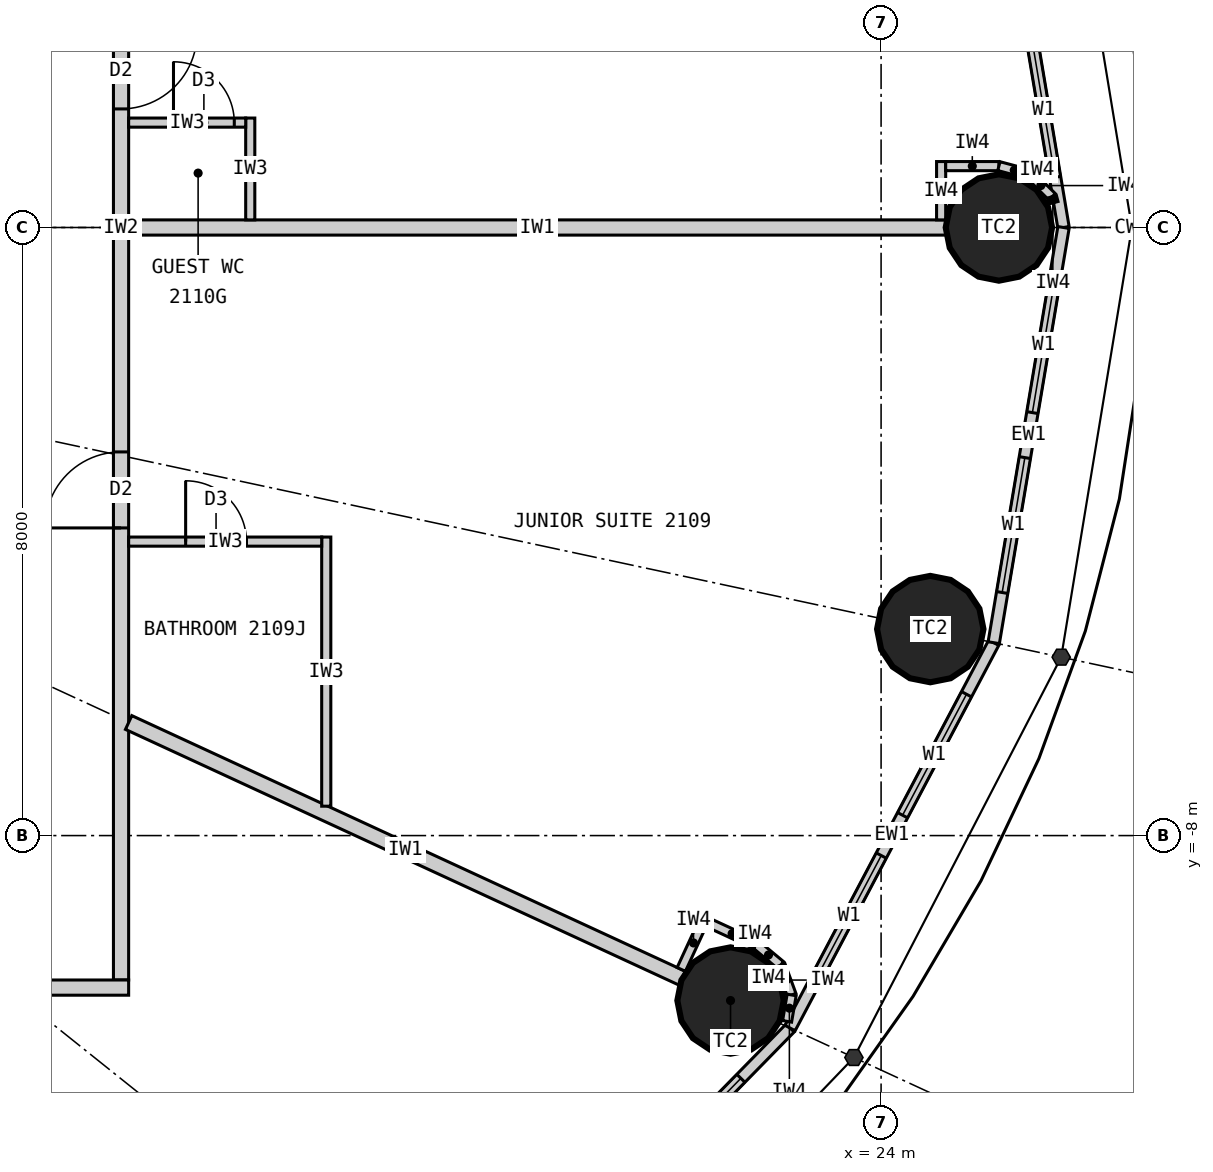
"""IFC4 building model, lengths in metres.
Left out: names, types, materials, properties, quantities, classifications, styles, units other than length and angle.
Written with IfcOpenShell. Run it as: python <this file> out.ifc"""

import sys

from ifc_helpers import new_model, si_unit, direction, frame, frame_2d, origin, origin_2d, place, context, subcontext, project, spatial, rectangle, circle, extrude, element, fill, save


model = new_model("IFC4")
c1 = context("Model", 3, precision=1e-05, world=origin(), true_north=direction((0.0, 1.0)))
c2 = subcontext(c1, "Body", "Model", "MODEL_VIEW")
j1 = project(units=[si_unit("LENGTHUNIT", "METRE"), si_unit("PLANEANGLEUNIT", "RADIAN")], contexts=[c1])
p1 = place(None, origin())
s1 = spatial("IfcSite", under=j1, at=p1, CompositionType="ELEMENT")
p2 = place(p1, origin())
s2 = spatial("IfcBuilding", under=s1, at=p2, CompositionType="ELEMENT")
p3 = place(p2, frame((0.0, 0.0, 83.7)))
s3 = spatial("IfcBuildingStorey", under=s2, at=p3, CompositionType="ELEMENT", Elevation=83.7)
for number, where, z_axis, x_axis in (
    (1, (25.55, 0.0, 0.0), (0.0, 0.0, 1.0), (1.0, 0.0, 0.0)),
    (2, (22.019, -10.17, 0.0), (0.0, 0.0, 1.0), (1.0, 0.0, 0.0)),
    (3, (24.647, -5.283, 0.0), (0.0, 0.0, 1.0), (1.0, 0.0, 0.0)),
):
    element("IfcColumn", number, at=place(p3, frame(where, z_axis=z_axis, x_axis=x_axis)), inside=s3, PredefinedType="COLUMN", context=c2, shape_type="SweptSolid", body=[
        extrude(circle(Radius=0.7, at=origin_2d()), origin(), (0.0, 0.0, 1.0), 3.3),
    ])
p4 = place(p3, frame((26.4, 0.0, 0.0), z_axis=(0.0, 0.0, 1.0), x_axis=(-0.165642551694, 0.986185857264, 0.0)))
e4 = element("IfcWall", 4, at=p4, inside=s3, PredefinedType="ELEMENTEDWALL", context=c2, shape_type="SweptSolid", body=[
    extrude(rectangle(XDim=5.539, YDim=0.15, at=frame_2d((2.77, 0.0))), origin(), (0.0, 0.0, 1.0), 3.12),
])
p5 = place(p4, frame((0.669, 0.0, 0.9)))
e5 = element("IfcOpeningElement", 5, at=p5, cuts=e4, PredefinedType="OPENING", context=c2, shape_type="SweptSolid", body=[
    extrude(rectangle(XDim=1.8, YDim=1.9, at=frame_2d((0.9, 0.95))), frame((0.0, 0.085, 0.0), z_axis=(0.0, -1.0, 0.0), x_axis=(1.0, 0.0, 0.0)), (0.0, 0.0, 1.0), 0.17),
])
p6 = place(p4, frame((3.07, 0.0, 0.9)))
e6 = element("IfcOpeningElement", 6, at=p6, cuts=e4, PredefinedType="OPENING", context=c2, shape_type="SweptSolid", body=[
    extrude(rectangle(XDim=1.8, YDim=1.9, at=frame_2d((0.9, 0.95))), frame((0.0, 0.085, 0.0), z_axis=(0.0, -1.0, 0.0), x_axis=(1.0, 0.0, 0.0)), (0.0, 0.0, 1.0), 0.17),
])
p7 = place(p3, frame((18.57, -14.856, 0.0), z_axis=(0.0, 0.0, 1.0), x_axis=(0.699602905915, 0.714531856557, 0.0)))
e7 = element("IfcWall", 7, at=p7, inside=s3, PredefinedType="ELEMENTEDWALL", context=c2, shape_type="SweptSolid", body=[
    extrude(rectangle(XDim=6.051, YDim=0.15, at=frame_2d((3.025, 0.0))), origin(), (0.0, 0.0, 1.0), 3.12),
])
p8 = place(p7, frame((0.926, 0.0, 0.9)))
e8 = element("IfcOpeningElement", 8, at=p8, cuts=e7, PredefinedType="OPENING", context=c2, shape_type="SweptSolid", body=[
    extrude(rectangle(XDim=1.8, YDim=1.9, at=frame_2d((0.9, 0.95))), frame((0.0, 0.085, 0.0), z_axis=(0.0, -1.0, 0.0), x_axis=(1.0, 0.0, 0.0)), (0.0, 0.0, 1.0), 0.17),
])
p9 = place(p7, frame((3.325, 0.0, 0.9)))
e9 = element("IfcOpeningElement", 9, at=p9, cuts=e7, PredefinedType="OPENING", context=c2, shape_type="SweptSolid", body=[
    extrude(rectangle(XDim=1.8, YDim=1.9, at=frame_2d((0.9, 0.95))), frame((0.0, 0.085, 0.0), z_axis=(0.0, -1.0, 0.0), x_axis=(1.0, 0.0, 0.0)), (0.0, 0.0, 1.0), 0.17),
])
p10 = place(p3, frame((22.803, -10.532, 0.0), z_axis=(0.0, 0.0, 1.0), x_axis=(0.467296867008, 0.884100468321, 0.0)))
e10 = element("IfcWall", 10, at=p10, inside=s3, PredefinedType="ELEMENTEDWALL", context=c2, shape_type="SweptSolid", body=[
    extrude(rectangle(XDim=5.734, YDim=0.15, at=frame_2d((2.867, 0.0))), origin(), (0.0, 0.0, 1.0), 3.12),
])
p11 = place(p10, frame((0.767, 0.0, 0.9)))
e11 = element("IfcOpeningElement", 11, at=p11, cuts=e10, PredefinedType="OPENING", context=c2, shape_type="SweptSolid", body=[
    extrude(rectangle(XDim=1.8, YDim=1.9, at=frame_2d((0.9, 0.95))), frame((0.0, 0.085, 0.0), z_axis=(0.0, -1.0, 0.0), x_axis=(1.0, 0.0, 0.0)), (0.0, 0.0, 1.0), 0.17),
])
p12 = place(p10, frame((3.167, 0.0, 0.9)))
e12 = element("IfcOpeningElement", 12, at=p12, cuts=e10, PredefinedType="OPENING", context=c2, shape_type="SweptSolid", body=[
    extrude(rectangle(XDim=1.8, YDim=1.9, at=frame_2d((0.9, 0.95))), frame((0.0, 0.085, 0.0), z_axis=(0.0, -1.0, 0.0), x_axis=(1.0, 0.0, 0.0)), (0.0, 0.0, 1.0), 0.17),
])
p13 = place(p3, frame((25.482, -5.462, 0.0), z_axis=(0.0, 0.0, 1.0), x_axis=(0.165642551694, 0.986185857264, 0.0)))
e13 = element("IfcWall", 13, at=p13, inside=s3, PredefinedType="ELEMENTEDWALL", context=c2, shape_type="SweptSolid", body=[
    extrude(rectangle(XDim=5.539, YDim=0.15, at=frame_2d((2.77, 0.0))), origin(), (0.0, 0.0, 1.0), 3.12),
])
p14 = place(p13, frame((0.669, 0.0, 0.9)))
e14 = element("IfcOpeningElement", 14, at=p14, cuts=e13, PredefinedType="OPENING", context=c2, shape_type="SweptSolid", body=[
    extrude(rectangle(XDim=1.8, YDim=1.9, at=frame_2d((0.9, 0.95))), frame((0.0, 0.085, 0.0), z_axis=(0.0, -1.0, 0.0), x_axis=(1.0, 0.0, 0.0)), (0.0, 0.0, 1.0), 0.17),
])
p15 = place(p13, frame((3.07, 0.0, 0.9)))
e15 = element("IfcOpeningElement", 15, at=p15, cuts=e13, PredefinedType="OPENING", context=c2, shape_type="SweptSolid", body=[
    extrude(rectangle(XDim=1.8, YDim=1.9, at=frame_2d((0.9, 0.95))), frame((0.0, 0.085, 0.0), z_axis=(0.0, -1.0, 0.0), x_axis=(1.0, 0.0, 0.0)), (0.0, 0.0, 1.0), 0.17),
])
p16 = place(p3, frame((14.0, -9.9, 0.0), z_axis=(0.0, 0.0, 1.0), x_axis=(0.0, 1.0, 0.0)))
e16 = element("IfcWall", 16, at=p16, inside=s3, PredefinedType="PARTITIONING", context=c2, shape_type="SweptSolid", body=[
    extrude(rectangle(XDim=19.8, YDim=0.2, at=frame_2d((9.9, 0.0))), origin(), (0.0, 0.0, 1.0), 3.12),
])
p17 = place(p16, frame((5.948, 0.0, 0.0)))
e17 = element("IfcOpeningElement", 17, at=p17, cuts=e16, PredefinedType="OPENING", context=c2, shape_type="SweptSolid", body=[
    extrude(rectangle(XDim=1.0, YDim=2.2, at=frame_2d((0.5, 1.1))), frame((0.0, 0.11, 0.0), z_axis=(0.0, -1.0, 0.0), x_axis=(1.0, 0.0, 0.0)), (0.0, 0.0, 1.0), 0.22),
])
p18 = place(p16, frame((11.46, 0.0, 0.0)))
e18 = element("IfcOpeningElement", 18, at=p18, cuts=e16, PredefinedType="OPENING", context=c2, shape_type="SweptSolid", body=[
    extrude(rectangle(XDim=1.0, YDim=2.2, at=frame_2d((0.5, 1.1))), frame((0.0, 0.11, 0.0), z_axis=(0.0, -1.0, 0.0), x_axis=(1.0, 0.0, 0.0)), (0.0, 0.0, 1.0), 0.22),
])
p19 = place(p3, frame((14.1, -10.0, 0.0), z_axis=(0.0, 0.0, 1.0), x_axis=(-1.0, 0.0, 0.0)))
e19 = element("IfcWall", 19, at=p19, inside=s3, PredefinedType="PARTITIONING", context=c2, shape_type="SweptSolid", body=[
    extrude(rectangle(XDim=28.2, YDim=0.2, at=frame_2d((14.1, 0.0))), origin(), (0.0, 0.0, 1.0), 3.12),
])
p20 = place(p19, frame((23.865, 0.0, 0.0)))
e20 = element("IfcOpeningElement", 20, at=p20, cuts=e19, PredefinedType="OPENING", context=c2, shape_type="SweptSolid", body=[
    extrude(rectangle(XDim=1.0, YDim=2.2, at=frame_2d((0.5, 1.1))), frame((0.0, 0.11, 0.0), z_axis=(0.0, -1.0, 0.0), x_axis=(1.0, 0.0, 0.0)), (0.0, 0.0, 1.0), 0.22),
])
p21 = place(p19, frame((18.529, 0.0, 0.0)))
e21 = element("IfcOpeningElement", 21, at=p21, cuts=e19, PredefinedType="OPENING", context=c2, shape_type="SweptSolid", body=[
    extrude(rectangle(XDim=1.0, YDim=2.2, at=frame_2d((0.5, 1.1))), frame((0.0, 0.11, 0.0), z_axis=(0.0, -1.0, 0.0), x_axis=(1.0, 0.0, 0.0)), (0.0, 0.0, 1.0), 0.22),
])
p22 = place(p19, frame((14.923, 0.0, 0.0)))
e22 = element("IfcOpeningElement", 22, at=p22, cuts=e19, PredefinedType="OPENING", context=c2, shape_type="SweptSolid", body=[
    extrude(rectangle(XDim=1.0, YDim=2.2, at=frame_2d((0.5, 1.1))), frame((0.0, 0.11, 0.0), z_axis=(0.0, -1.0, 0.0), x_axis=(1.0, 0.0, 0.0)), (0.0, 0.0, 1.0), 0.22),
])
p23 = place(p19, frame((2.801, 0.0, 0.0)))
e23 = element("IfcOpeningElement", 23, at=p23, cuts=e19, PredefinedType="OPENING", context=c2, shape_type="SweptSolid", body=[
    extrude(rectangle(XDim=1.0, YDim=2.2, at=frame_2d((0.5, 1.1))), frame((0.0, 0.11, 0.0), z_axis=(0.0, -1.0, 0.0), x_axis=(1.0, 0.0, 0.0)), (0.0, 0.0, 1.0), 0.22),
])
p24 = place(p3, frame((14.1, 0.0, 0.0), z_axis=(0.0, 0.0, 1.0), x_axis=(1.0, 0.0, 0.0)))
e24 = element("IfcWall", 24, at=p24, inside=s3, PredefinedType="PARTITIONING", context=c2, shape_type="SweptSolid", body=[
    extrude(rectangle(XDim=10.75, YDim=0.2, at=frame_2d((5.375, 0.0))), origin(), (0.0, 0.0, 1.0), 2.27),
])
p25 = place(p3, frame((14.1, -6.512, 0.0), z_axis=(0.0, 0.0, 1.0), x_axis=(0.907832871056, -0.419332181247, 0.0)))
e25 = element("IfcWall", 25, at=p25, inside=s3, PredefinedType="PARTITIONING", context=c2, shape_type="SweptSolid", body=[
    extrude(rectangle(XDim=8.023, YDim=0.2, at=frame_2d((4.011, 0.0))), origin(), (0.0, 0.0, 1.0), 2.32),
])
p26 = place(p3, frame((16.7, -7.613, 0.0), z_axis=(0.0, 0.0, 1.0), x_axis=(0.0, 1.0, 0.0)))
e26 = element("IfcWall", 26, at=p26, inside=s3, PredefinedType="PARTITIONING", context=c2, shape_type="SweptSolid", body=[
    extrude(rectangle(XDim=3.541, YDim=0.12, at=frame_2d((1.771, 0.0))), origin(), (0.0, 0.0, 1.0), 3.12),
])
p27 = place(p3, frame((14.1, -4.133, 0.0), z_axis=(0.0, 0.0, 1.0), x_axis=(1.0, 0.0, 0.0)))
e27 = element("IfcWall", 27, at=p27, inside=s3, PredefinedType="PARTITIONING", context=c2, shape_type="SweptSolid", body=[
    extrude(rectangle(XDim=2.54, YDim=0.12, at=frame_2d((1.27, 0.0))), origin(), (0.0, 0.0, 1.0), 2.32),
])
p28 = place(p27, frame((0.75, 0.0, 0.0)))
e28 = element("IfcOpeningElement", 28, at=p28, cuts=e27, PredefinedType="OPENING", context=c2, shape_type="SweptSolid", body=[
    extrude(rectangle(XDim=0.8, YDim=2.1, at=frame_2d((0.4, 1.05))), frame((0.0, 0.07, 0.0), z_axis=(0.0, -1.0, 0.0), x_axis=(1.0, 0.0, 0.0)), (0.0, 0.0, 1.0), 0.14),
])
p29 = place(p3, frame((15.7, 0.1, 0.0), z_axis=(0.0, 0.0, 1.0), x_axis=(0.0, 1.0, 0.0)))
e29 = element("IfcWall", 29, at=p29, inside=s3, PredefinedType="PARTITIONING", context=c2, shape_type="SweptSolid", body=[
    extrude(rectangle(XDim=1.34, YDim=0.12, at=frame_2d((0.67, 0.0))), origin(), (0.0, 0.0, 1.0), 3.12),
])
p30 = place(p3, frame((14.1, 1.38, 0.0), z_axis=(0.0, 0.0, 1.0), x_axis=(1.0, 0.0, 0.0)))
e30 = element("IfcWall", 30, at=p30, inside=s3, PredefinedType="PARTITIONING", context=c2, shape_type="SweptSolid", body=[
    extrude(rectangle(XDim=1.54, YDim=0.12, at=frame_2d((0.77, 0.0))), origin(), (0.0, 0.0, 1.0), 2.32),
])
p31 = place(p30, frame((0.59, 0.0, 0.0)))
e31 = element("IfcOpeningElement", 31, at=p31, cuts=e30, PredefinedType="OPENING", context=c2, shape_type="SweptSolid", body=[
    extrude(rectangle(XDim=0.8, YDim=2.1, at=frame_2d((0.4, 1.05))), frame((0.0, 0.07, 0.0), z_axis=(0.0, -1.0, 0.0), x_axis=(1.0, 0.0, 0.0)), (0.0, 0.0, 1.0), 0.14),
])
p32 = place(p3, frame((24.79, 0.1, 0.0), z_axis=(0.0, 0.0, 1.0), x_axis=(0.0, 1.0, 0.0)))
e32 = element("IfcWall", 32, at=p32, inside=s3, PredefinedType="PARTITIONING", context=c2, shape_type="SweptSolid", body=[
    extrude(rectangle(XDim=0.767, YDim=0.12, at=frame_2d((0.384, 0.0))), origin(), (0.0, 0.0, 1.0), 3.12),
])
p33 = place(p3, frame((24.85, 0.808, 0.0), z_axis=(0.0, 0.0, 1.0), x_axis=(1.0, 0.0, 0.0)))
e33 = element("IfcWall", 33, at=p33, inside=s3, PredefinedType="PARTITIONING", context=c2, shape_type="SweptSolid", body=[
    extrude(rectangle(XDim=0.7, YDim=0.12, at=frame_2d((0.35, 0.0))), origin(), (0.0, 0.0, 1.0), 3.12),
])
p34 = place(p3, frame((25.55, 0.808, 0.0), z_axis=(0.0, 0.0, 1.0), x_axis=(0.965807183573, -0.2592614205, 0.0)))
e34 = element("IfcWall", 34, at=p34, inside=s3, PredefinedType="PARTITIONING", context=c2, shape_type="SweptSolid", body=[
    extrude(rectangle(XDim=0.418, YDim=0.12, at=frame_2d((0.209, 0.0))), origin(), (0.0, 0.0, 1.0), 3.12),
])
p35 = place(p3, frame((25.954, 0.699, 0.0), z_axis=(0.0, 0.0, 1.0), x_axis=(0.707106781187, -0.707106781187, 0.0)))
e35 = element("IfcWall", 35, at=p35, inside=s3, PredefinedType="PARTITIONING", context=c2, shape_type="SweptSolid", body=[
    extrude(rectangle(XDim=0.418, YDim=0.12, at=frame_2d((0.209, 0.0))), origin(), (0.0, 0.0, 1.0), 3.12),
])
p36 = place(p3, frame((26.249, 0.404, 0.0), z_axis=(0.0, 0.0, 1.0), x_axis=(0.259754282609, -0.965674744759, 0.0)))
e36 = element("IfcWall", 36, at=p36, inside=s3, PredefinedType="PARTITIONING", context=c2, shape_type="SweptSolid", body=[
    extrude(rectangle(XDim=0.08, YDim=0.12, at=frame_2d((0.04, 0.0))), origin(), (0.0, 0.0, 1.0), 3.12),
])
p37 = place(p3, frame((21.371, -9.761, 0.0), z_axis=(0.0, 0.0, 1.0), x_axis=(0.419259891039, 0.907866258744, 0.0)))
e37 = element("IfcWall", 37, at=p37, inside=s3, PredefinedType="PARTITIONING", context=c2, shape_type="SweptSolid", body=[
    extrude(rectangle(XDim=0.768, YDim=0.12, at=frame_2d((0.384, 0.0))), origin(), (0.0, 0.0, 1.0), 3.12),
])
p38 = place(p3, frame((21.722, -9.144, 0.0), z_axis=(0.0, 0.0, 1.0), x_axis=(0.907877701396, -0.419235112208, 0.0)))
e38 = element("IfcWall", 38, at=p38, inside=s3, PredefinedType="PARTITIONING", context=c2, shape_type="SweptSolid", body=[
    extrude(rectangle(XDim=0.7, YDim=0.12, at=frame_2d((0.35, 0.0))), origin(), (0.0, 0.0, 1.0), 3.12),
])
p39 = place(p3, frame((22.358, -9.437, 0.0), z_axis=(0.0, 0.0, 1.0), x_axis=(0.768412687942, -0.639954639806, 0.0)))
e39 = element("IfcWall", 39, at=p39, inside=s3, PredefinedType="PARTITIONING", context=c2, shape_type="SweptSolid", body=[
    extrude(rectangle(XDim=0.418, YDim=0.12, at=frame_2d((0.209, 0.0))), origin(), (0.0, 0.0, 1.0), 3.12),
])
p40 = place(p3, frame((22.679, -9.705, 0.0), z_axis=(0.0, 0.0, 1.0), x_axis=(0.345164001646, -0.938542386879, 0.0)))
e40 = element("IfcWall", 40, at=p40, inside=s3, PredefinedType="PARTITIONING", context=c2, shape_type="SweptSolid", body=[
    extrude(rectangle(XDim=0.418, YDim=0.12, at=frame_2d((0.209, 0.0))), origin(), (0.0, 0.0, 1.0), 3.12),
])
p41 = place(p3, frame((22.823, -10.097, 0.0), z_axis=(0.0, 0.0, 1.0), x_axis=(-0.169674995186, -0.985500074079, 0.0)))
e41 = element("IfcWall", 41, at=p41, inside=s3, PredefinedType="PARTITIONING", context=c2, shape_type="SweptSolid", body=[
    extrude(rectangle(XDim=0.353, YDim=0.12, at=frame_2d((0.176, 0.0))), origin(), (0.0, 0.0, 1.0), 3.12),
])
p42 = place(p5, origin())
e42 = element("IfcWindow", 42, at=p42, inside=s3, PartitioningType="SINGLE_PANEL", PredefinedType="WINDOW", context=c2, shape_type="SweptSolid", body=[
    extrude(rectangle(XDim=1.8, YDim=1.9, at=frame_2d((0.9, 0.95))), frame((0.0, 0.03, 0.0), z_axis=(0.0, -1.0, 0.0), x_axis=(1.0, 0.0, 0.0)), (0.0, 0.0, 1.0), 0.06),
])
fill(e5, e42)
p43 = place(p9, origin())
e43 = element("IfcWindow", 43, at=p43, inside=s3, PartitioningType="SINGLE_PANEL", PredefinedType="WINDOW", context=c2, shape_type="SweptSolid", body=[
    extrude(rectangle(XDim=1.8, YDim=1.9, at=frame_2d((0.9, 0.95))), frame((0.0, 0.03, 0.0), z_axis=(0.0, -1.0, 0.0), x_axis=(1.0, 0.0, 0.0)), (0.0, 0.0, 1.0), 0.06),
])
fill(e9, e43)
p44 = place(p11, origin())
e44 = element("IfcWindow", 44, at=p44, inside=s3, PartitioningType="SINGLE_PANEL", PredefinedType="WINDOW", context=c2, shape_type="SweptSolid", body=[
    extrude(rectangle(XDim=1.8, YDim=1.9, at=frame_2d((0.9, 0.95))), frame((0.0, 0.03, 0.0), z_axis=(0.0, -1.0, 0.0), x_axis=(1.0, 0.0, 0.0)), (0.0, 0.0, 1.0), 0.06),
])
fill(e11, e44)
p45 = place(p12, origin())
e45 = element("IfcWindow", 45, at=p45, inside=s3, PartitioningType="SINGLE_PANEL", PredefinedType="WINDOW", context=c2, shape_type="SweptSolid", body=[
    extrude(rectangle(XDim=1.8, YDim=1.9, at=frame_2d((0.9, 0.95))), frame((0.0, 0.03, 0.0), z_axis=(0.0, -1.0, 0.0), x_axis=(1.0, 0.0, 0.0)), (0.0, 0.0, 1.0), 0.06),
])
fill(e12, e45)
p46 = place(p14, origin())
e46 = element("IfcWindow", 46, at=p46, inside=s3, PartitioningType="SINGLE_PANEL", PredefinedType="WINDOW", context=c2, shape_type="SweptSolid", body=[
    extrude(rectangle(XDim=1.8, YDim=1.9, at=frame_2d((0.9, 0.95))), frame((0.0, 0.03, 0.0), z_axis=(0.0, -1.0, 0.0), x_axis=(1.0, 0.0, 0.0)), (0.0, 0.0, 1.0), 0.06),
])
fill(e14, e46)
p47 = place(p15, origin())
e47 = element("IfcWindow", 47, at=p47, inside=s3, PartitioningType="SINGLE_PANEL", PredefinedType="WINDOW", context=c2, shape_type="SweptSolid", body=[
    extrude(rectangle(XDim=1.8, YDim=1.9, at=frame_2d((0.9, 0.95))), frame((0.0, 0.03, 0.0), z_axis=(0.0, -1.0, 0.0), x_axis=(1.0, 0.0, 0.0)), (0.0, 0.0, 1.0), 0.06),
])
fill(e15, e47)
p48 = place(p28, origin())
e48 = element("IfcDoor", 48, at=p48, inside=s3, OperationType="SINGLE_SWING_LEFT", PredefinedType="DOOR", context=c2, shape_type="SweptSolid", body=[
    extrude(rectangle(XDim=0.8, YDim=2.1, at=frame_2d((0.4, 1.05))), frame((0.0, 0.025, 0.0), z_axis=(0.0, -1.0, 0.0), x_axis=(1.0, 0.0, 0.0)), (0.0, 0.0, 1.0), 0.05),
])
fill(e28, e48)
p49 = place(p17, origin())
e49 = element("IfcDoor", 49, at=p49, inside=s3, OperationType="SINGLE_SWING_LEFT", PredefinedType="DOOR", context=c2, shape_type="SweptSolid", body=[
    extrude(rectangle(XDim=1.0, YDim=2.2, at=frame_2d((0.5, 1.1))), frame((0.0, 0.025, 0.0), z_axis=(0.0, -1.0, 0.0), x_axis=(1.0, 0.0, 0.0)), (0.0, 0.0, 1.0), 0.05),
])
fill(e17, e49)
p50 = place(p31, origin())
e50 = element("IfcDoor", 50, at=p50, inside=s3, OperationType="SINGLE_SWING_LEFT", PredefinedType="DOOR", context=c2, shape_type="SweptSolid", body=[
    extrude(rectangle(XDim=0.8, YDim=2.1, at=frame_2d((0.4, 1.05))), frame((0.0, 0.025, 0.0), z_axis=(0.0, -1.0, 0.0), x_axis=(1.0, 0.0, 0.0)), (0.0, 0.0, 1.0), 0.05),
])
fill(e31, e50)
p51 = place(p18, origin())
e51 = element("IfcDoor", 51, at=p51, inside=s3, OperationType="SINGLE_SWING_RIGHT", PredefinedType="DOOR", context=c2, shape_type="SweptSolid", body=[
    extrude(rectangle(XDim=1.0, YDim=2.2, at=frame_2d((0.5, 1.1))), frame((0.0, 0.025, 0.0), z_axis=(0.0, -1.0, 0.0), x_axis=(1.0, 0.0, 0.0)), (0.0, 0.0, 1.0), 0.05),
])
fill(e18, e51)
save(model, sys.argv[1])
